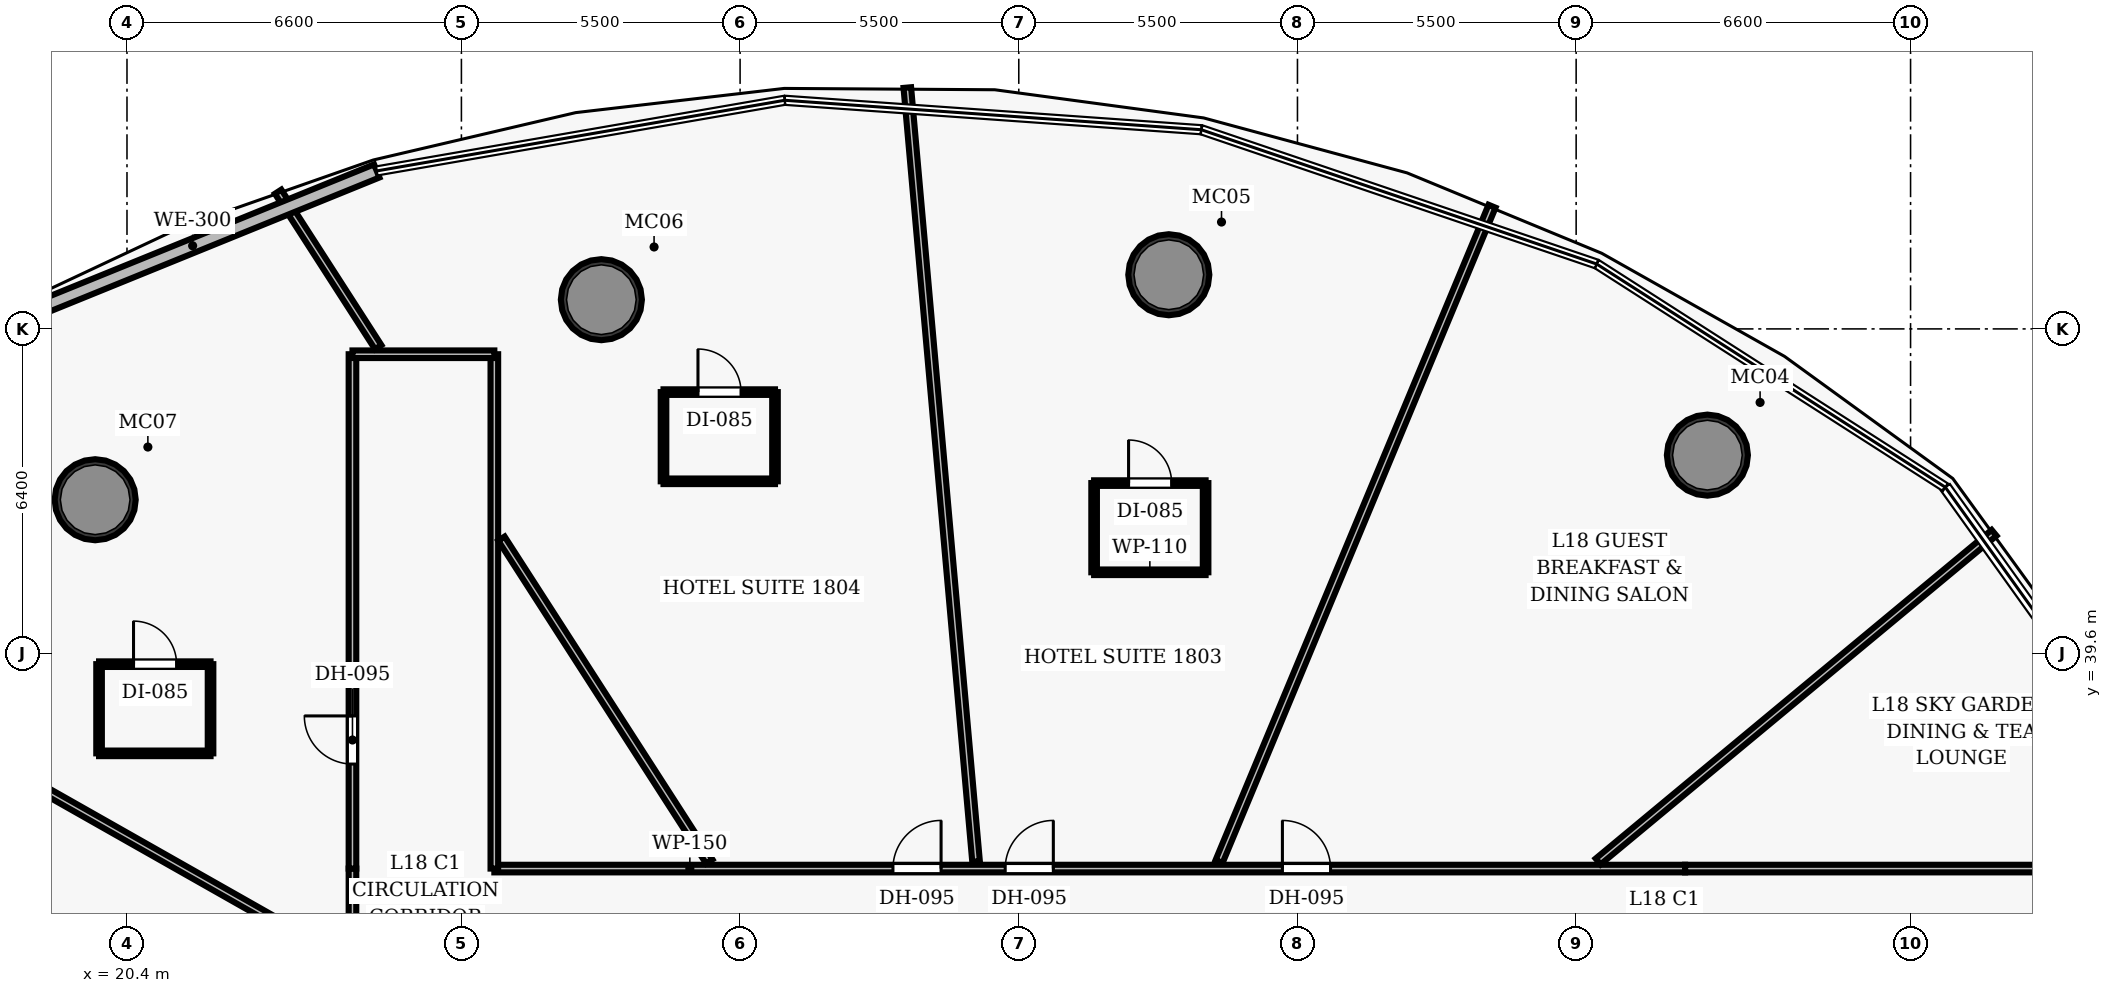
"""IFC4 building model, lengths in metres.
Left out: names, types, materials, properties, quantities, classifications, styles, units other than length and angle.
Written with IfcOpenShell. Run it as: python <this file> out.ifc"""

import sys

from ifc_helpers import new_model, si_unit, direction, frame, frame_2d, origin, origin_2d, place, context, subcontext, project, spatial, rectangle, hollow_circle, extrude, element, fill, save


model = new_model("IFC4")
c1 = context("Model", 3, precision=1e-05, world=origin(), true_north=direction((0.0, 1.0)))
c2 = subcontext(c1, "Body", "Model", "MODEL_VIEW")
j1 = project(units=[si_unit("LENGTHUNIT", "METRE"), si_unit("PLANEANGLEUNIT", "RADIAN")], contexts=[c1])
p1 = place(None, origin())
s1 = spatial("IfcSite", under=j1, at=p1, CompositionType="ELEMENT")
p2 = place(p1, origin())
s2 = spatial("IfcBuilding", under=s1, at=p2, CompositionType="ELEMENT")
p3 = place(p2, frame((0.0, 0.0, 79.9)))
s3 = spatial("IfcBuildingStorey", under=s2, at=p3, CompositionType="ELEMENT", Elevation=79.9)
for number, where, z_axis, x_axis in (
    (1, (51.59, 43.509, 0.0), (0.0, 0.0, 1.0), (1.0, 0.0, 0.0)),
    (2, (40.961, 47.069, 0.0), (0.0, 0.0, 1.0), (1.0, 0.0, 0.0)),
    (3, (29.762, 46.577, 0.0), (0.0, 0.0, 1.0), (1.0, 0.0, 0.0)),
    (4, (19.772, 42.629, 0.0), (0.0, 0.0, 1.0), (1.0, 0.0, 0.0)),
):
    element("IfcColumn", number, at=place(p3, frame(where, z_axis=z_axis, x_axis=x_axis)), inside=s3, PredefinedType="COLUMN", context=c2, shape_type="SweptSolid", body=[
        extrude(hollow_circle(Radius=0.8, WallThickness=0.06, at=origin_2d()), origin(), (0.0, 0.0, 1.0), 3.5),
    ])
p4 = place(p3, frame((27.65, 35.35, 0.0), z_axis=(0.0, 0.0, 1.0), x_axis=(1.0, 0.0, 0.0)))
e5 = element("IfcWall", 5, at=p4, inside=s3, PredefinedType="PARTITIONING", context=c2, shape_type="SweptSolid", body=[
    extrude(rectangle(XDim=23.5, YDim=0.15, at=frame_2d((11.75, 0.0))), origin(), (0.0, 0.0, 1.0), 2.6),
])
p5 = place(p4, frame((15.553, 0.0, 0.0)))
e6 = element("IfcOpeningElement", 6, at=p5, cuts=e5, PredefinedType="OPENING", context=c2, shape_type="SweptSolid", body=[
    extrude(rectangle(XDim=0.95, YDim=2.15, at=frame_2d((0.475, 1.075))), frame((0.0, 0.085, 0.0), z_axis=(0.0, -1.0, 0.0), x_axis=(1.0, 0.0, 0.0)), (0.0, 0.0, 1.0), 0.17),
])
p6 = place(p4, frame((10.082, 0.0, 0.0)))
e7 = element("IfcOpeningElement", 7, at=p6, cuts=e5, PredefinedType="OPENING", context=c2, shape_type="SweptSolid", body=[
    extrude(rectangle(XDim=0.95, YDim=2.15, at=frame_2d((0.475, 1.075))), frame((0.0, 0.085, 0.0), z_axis=(0.0, -1.0, 0.0), x_axis=(1.0, 0.0, 0.0)), (0.0, 0.0, 1.0), 0.17),
])
p7 = place(p4, frame((7.866, 0.0, 0.0)))
e8 = element("IfcOpeningElement", 8, at=p7, cuts=e5, PredefinedType="OPENING", context=c2, shape_type="SweptSolid", body=[
    extrude(rectangle(XDim=0.95, YDim=2.15, at=frame_2d((0.475, 1.075))), frame((0.0, 0.085, 0.0), z_axis=(0.0, -1.0, 0.0), x_axis=(1.0, 0.0, 0.0)), (0.0, 0.0, 1.0), 0.17),
])
p8 = place(p3, frame((24.85, 19.45, 0.0), z_axis=(0.0, 0.0, 1.0), x_axis=(0.0, 1.0, 0.0)))
e9 = element("IfcWall", 9, at=p8, inside=s3, PredefinedType="PARTITIONING", context=c2, shape_type="SweptSolid", body=[
    extrude(rectangle(XDim=15.9, YDim=0.15, at=frame_2d((7.95, 0.0))), origin(), (0.0, 0.0, 1.0), 2.6),
])
p9 = place(p8, frame((8.128, 0.0, 0.0)))
e10 = element("IfcOpeningElement", 10, at=p9, cuts=e9, PredefinedType="OPENING", context=c2, shape_type="SweptSolid", body=[
    extrude(rectangle(XDim=0.95, YDim=2.15, at=frame_2d((0.475, 1.075))), frame((0.0, 0.085, 0.0), z_axis=(0.0, -1.0, 0.0), x_axis=(1.0, 0.0, 0.0)), (0.0, 0.0, 1.0), 0.17),
])
p10 = place(p8, frame((4.98, 0.0, 0.0)))
e11 = element("IfcOpeningElement", 11, at=p10, cuts=e9, PredefinedType="OPENING", context=c2, shape_type="SweptSolid", body=[
    extrude(rectangle(XDim=0.95, YDim=2.15, at=frame_2d((0.475, 1.075))), frame((0.0, 0.085, 0.0), z_axis=(0.0, -1.0, 0.0), x_axis=(1.0, 0.0, 0.0)), (0.0, 0.0, 1.0), 0.17),
])
p11 = place(p3, frame((51.15, 35.35, 0.0), z_axis=(0.0, 0.0, 1.0), x_axis=(1.0, 0.0, 0.0)))
e12 = element("IfcWall", 12, at=p11, inside=s3, PredefinedType="PARTITIONING", context=c2, shape_type="SweptSolid", body=[
    extrude(rectangle(XDim=10.405, YDim=0.15, at=frame_2d((5.203, 0.0))), origin(), (0.0, 0.0, 1.0), 2.6),
])
p12 = place(p3, frame((24.85, 35.35, 0.0), z_axis=(0.0, 0.0, 1.0), x_axis=(0.0, 1.0, 0.0)))
e13 = element("IfcWall", 13, at=p12, inside=s3, PredefinedType="PARTITIONING", context=c2, shape_type="SweptSolid", body=[
    extrude(rectangle(XDim=10.15, YDim=0.15, at=frame_2d((5.075, 0.0))), origin(), (0.0, 0.0, 1.0), 2.6),
])
p13 = place(p12, frame((2.062, 0.0, 0.0)))
e14 = element("IfcOpeningElement", 14, at=p13, cuts=e13, PredefinedType="OPENING", context=c2, shape_type="SweptSolid", body=[
    extrude(rectangle(XDim=0.95, YDim=2.15, at=frame_2d((0.475, 1.075))), frame((0.0, 0.085, 0.0), z_axis=(0.0, -1.0, 0.0), x_axis=(1.0, 0.0, 0.0)), (0.0, 0.0, 1.0), 0.17),
])
p14 = place(p3, frame((27.65, 35.35, 0.0), z_axis=(0.0, 0.0, 1.0), x_axis=(0.0, 1.0, 0.0)))
e15 = element("IfcWall", 15, at=p14, inside=s3, PredefinedType="PARTITIONING", context=c2, shape_type="SweptSolid", body=[
    extrude(rectangle(XDim=10.15, YDim=0.15, at=frame_2d((5.075, 0.0))), origin(), (0.0, 0.0, 1.0), 2.6),
])
p15 = place(p3, frame((24.85, 45.5, 0.0), z_axis=(0.0, 0.0, 1.0), x_axis=(1.0, 0.0, 0.0)))
e16 = element("IfcWall", 16, at=p15, inside=s3, PredefinedType="PARTITIONING", context=c2, shape_type="SweptSolid", body=[
    extrude(rectangle(XDim=2.8, YDim=0.15, at=frame_2d((1.4, 0.0))), origin(), (0.0, 0.0, 1.0), 2.6),
])
p16 = place(p3, frame((49.434, 35.49, 0.0), z_axis=(0.0, 0.0, 1.0), x_axis=(0.769488794151, 0.638660313216, 0.0)))
e17 = element("IfcWall", 17, at=p16, inside=s3, PredefinedType="PARTITIONING", context=c2, shape_type="SweptSolid", body=[
    extrude(rectangle(XDim=10.155, YDim=0.15, at=frame_2d((5.078, 0.0))), origin(), (0.0, 0.0, 1.0), 2.6),
])
p17 = place(p3, frame((41.953, 35.49, 0.0), z_axis=(0.0, 0.0, 1.0), x_axis=(0.384538657387, 0.923108889013, 0.0)))
e18 = element("IfcWall", 18, at=p17, inside=s3, PredefinedType="PARTITIONING", context=c2, shape_type="SweptSolid", body=[
    extrude(rectangle(XDim=14.008, YDim=0.15, at=frame_2d((7.004, 0.0))), origin(), (0.0, 0.0, 1.0), 2.6),
])
p18 = place(p3, frame((37.157, 35.49, 0.0), z_axis=(0.0, 0.0, 1.0), x_axis=(-0.088499768289, 0.996076197393, 0.0)))
e19 = element("IfcWall", 19, at=p18, inside=s3, PredefinedType="PARTITIONING", context=c2, shape_type="SweptSolid", body=[
    extrude(rectangle(XDim=15.333, YDim=0.15, at=frame_2d((7.666, 0.0))), origin(), (0.0, 0.0, 1.0), 2.6),
])
p19 = place(p3, frame((31.891, 35.49, 0.0), z_axis=(0.0, 0.0, 1.0), x_axis=(-0.541252535473, 0.840860091123, 0.0)))
e20 = element("IfcWall", 20, at=p19, inside=s3, PredefinedType="PARTITIONING", context=c2, shape_type="SweptSolid", body=[
    extrude(rectangle(XDim=7.577, YDim=0.15, at=frame_2d((3.789, 0.0))), origin(), (0.0, 0.0, 1.0), 2.6),
])
p20 = place(p3, frame((25.358, 45.64, 0.0), z_axis=(0.0, 0.0, 1.0), x_axis=(-0.541288402423, 0.840837002874, 0.0)))
e21 = element("IfcWall", 21, at=p20, inside=s3, PredefinedType="PARTITIONING", context=c2, shape_type="SweptSolid", body=[
    extrude(rectangle(XDim=3.649, YDim=0.15, at=frame_2d((1.824, 0.0))), origin(), (0.0, 0.0, 1.0), 2.6),
])
p21 = place(p3, frame((24.71, 33.531, 0.0), z_axis=(0.0, 0.0, 1.0), x_axis=(-0.87002725421, 0.493003627707, 0.0)))
e22 = element("IfcWall", 22, at=p21, inside=s3, PredefinedType="PARTITIONING", context=c2, shape_type="SweptSolid", body=[
    extrude(rectangle(XDim=15.84, YDim=0.15, at=frame_2d((7.92, 0.0))), origin(), (0.0, 0.0, 1.0), 2.6),
])
p22 = place(p3, frame((39.487, 41.197, 0.0), z_axis=(0.0, 0.0, 1.0), x_axis=(1.0, 0.0, 0.0)))
e23 = element("IfcWall", 23, at=p22, inside=s3, PredefinedType="PARTITIONING", context=c2, shape_type="SweptSolid", body=[
    extrude(rectangle(XDim=2.2, YDim=0.11, at=frame_2d((1.1, 0.0))), origin(), (0.0, 0.0, 1.0), 2.6),
])
p23 = place(p3, frame((39.487, 42.957, 0.0), z_axis=(0.0, 0.0, 1.0), x_axis=(1.0, 0.0, 0.0)))
e24 = element("IfcWall", 24, at=p23, inside=s3, PredefinedType="PARTITIONING", context=c2, shape_type="SweptSolid", body=[
    extrude(rectangle(XDim=2.2, YDim=0.11, at=frame_2d((1.1, 0.0))), origin(), (0.0, 0.0, 1.0), 2.6),
])
p24 = place(p23, frame((0.68, 0.0, 0.0)))
e25 = element("IfcOpeningElement", 25, at=p24, cuts=e24, PredefinedType="OPENING", context=c2, shape_type="SweptSolid", body=[
    extrude(rectangle(XDim=0.85, YDim=2.1, at=frame_2d((0.425, 1.05))), frame((0.0, 0.065, 0.0), z_axis=(0.0, -1.0, 0.0), x_axis=(1.0, 0.0, 0.0)), (0.0, 0.0, 1.0), 0.13),
])
for number, where, z_axis, x_axis in (
    (26, (39.487, 41.197, 0.0), (0.0, 0.0, 1.0), (0.0, 1.0, 0.0)),
    (27, (41.687, 41.197, 0.0), (0.0, 0.0, 1.0), (0.0, 1.0, 0.0)),
):
    element("IfcWall", number, at=place(p3, frame(where, z_axis=z_axis, x_axis=x_axis)), inside=s3, PredefinedType="PARTITIONING", context=c2, shape_type="SweptSolid", body=[
        extrude(rectangle(XDim=1.76, YDim=0.11, at=frame_2d((0.88, 0.0))), origin(), (0.0, 0.0, 1.0), 2.6),
    ])
p25 = place(p3, frame((30.989, 42.993, 0.0), z_axis=(0.0, 0.0, 1.0), x_axis=(1.0, 0.0, 0.0)))
e28 = element("IfcWall", 28, at=p25, inside=s3, PredefinedType="PARTITIONING", context=c2, shape_type="SweptSolid", body=[
    extrude(rectangle(XDim=2.2, YDim=0.11, at=frame_2d((1.1, 0.0))), origin(), (0.0, 0.0, 1.0), 2.6),
])
p26 = place(p3, frame((30.989, 44.753, 0.0), z_axis=(0.0, 0.0, 1.0), x_axis=(1.0, 0.0, 0.0)))
e29 = element("IfcWall", 29, at=p26, inside=s3, PredefinedType="PARTITIONING", context=c2, shape_type="SweptSolid", body=[
    extrude(rectangle(XDim=2.2, YDim=0.11, at=frame_2d((1.1, 0.0))), origin(), (0.0, 0.0, 1.0), 2.6),
])
p27 = place(p26, frame((0.68, 0.0, 0.0)))
e30 = element("IfcOpeningElement", 30, at=p27, cuts=e29, PredefinedType="OPENING", context=c2, shape_type="SweptSolid", body=[
    extrude(rectangle(XDim=0.85, YDim=2.1, at=frame_2d((0.425, 1.05))), frame((0.0, 0.065, 0.0), z_axis=(0.0, -1.0, 0.0), x_axis=(1.0, 0.0, 0.0)), (0.0, 0.0, 1.0), 0.13),
])
for number, where, z_axis, x_axis in (
    (31, (30.989, 42.993, 0.0), (0.0, 0.0, 1.0), (0.0, 1.0, 0.0)),
    (32, (33.189, 42.993, 0.0), (0.0, 0.0, 1.0), (0.0, 1.0, 0.0)),
):
    element("IfcWall", number, at=place(p3, frame(where, z_axis=z_axis, x_axis=x_axis)), inside=s3, PredefinedType="PARTITIONING", context=c2, shape_type="SweptSolid", body=[
        extrude(rectangle(XDim=1.76, YDim=0.11, at=frame_2d((0.88, 0.0))), origin(), (0.0, 0.0, 1.0), 2.6),
    ])
p28 = place(p3, frame((19.849, 37.624, 0.0), z_axis=(0.0, 0.0, 1.0), x_axis=(1.0, 0.0, 0.0)))
e33 = element("IfcWall", 33, at=p28, inside=s3, PredefinedType="PARTITIONING", context=c2, shape_type="SweptSolid", body=[
    extrude(rectangle(XDim=2.2, YDim=0.11, at=frame_2d((1.1, 0.0))), origin(), (0.0, 0.0, 1.0), 2.6),
])
p29 = place(p3, frame((19.849, 39.384, 0.0), z_axis=(0.0, 0.0, 1.0), x_axis=(1.0, 0.0, 0.0)))
e34 = element("IfcWall", 34, at=p29, inside=s3, PredefinedType="PARTITIONING", context=c2, shape_type="SweptSolid", body=[
    extrude(rectangle(XDim=2.2, YDim=0.11, at=frame_2d((1.1, 0.0))), origin(), (0.0, 0.0, 1.0), 2.6),
])
p30 = place(p29, frame((0.68, 0.0, 0.0)))
e35 = element("IfcOpeningElement", 35, at=p30, cuts=e34, PredefinedType="OPENING", context=c2, shape_type="SweptSolid", body=[
    extrude(rectangle(XDim=0.85, YDim=2.1, at=frame_2d((0.425, 1.05))), frame((0.0, 0.065, 0.0), z_axis=(0.0, -1.0, 0.0), x_axis=(1.0, 0.0, 0.0)), (0.0, 0.0, 1.0), 0.13),
])
for number, where, z_axis, x_axis in (
    (36, (19.849, 37.624, 0.0), (0.0, 0.0, 1.0), (0.0, 1.0, 0.0)),
    (37, (22.049, 37.624, 0.0), (0.0, 0.0, 1.0), (0.0, 1.0, 0.0)),
):
    element("IfcWall", number, at=place(p3, frame(where, z_axis=z_axis, x_axis=x_axis)), inside=s3, PredefinedType="PARTITIONING", context=c2, shape_type="SweptSolid", body=[
        extrude(rectangle(XDim=1.76, YDim=0.11, at=frame_2d((0.88, 0.0))), origin(), (0.0, 0.0, 1.0), 2.6),
    ])
p31 = place(p3, frame((18.062, 46.164, 0.0), z_axis=(0.0, 0.0, 1.0), x_axis=(0.926415021548, 0.376503928067, 0.0)))
e38 = element("IfcWall", 38, at=p31, inside=s3, PredefinedType="SOLIDWALL", context=c2, shape_type="SweptSolid", body=[
    extrude(rectangle(XDim=7.845, YDim=0.28, at=frame_2d((3.922, 0.0))), origin(), (0.0, 0.0, 1.0), 3.25),
])
p32 = place(p5, origin())
e39 = element("IfcDoor", 39, at=p32, inside=s3, OperationType="SINGLE_SWING_LEFT", PredefinedType="DOOR", context=c2, shape_type="SweptSolid", body=[
    extrude(rectangle(XDim=0.95, YDim=2.15, at=frame_2d((0.475, 1.075))), frame((0.0, 0.025, 0.0), z_axis=(0.0, -1.0, 0.0), x_axis=(1.0, 0.0, 0.0)), (0.0, 0.0, 1.0), 0.05),
])
fill(e6, e39)
p33 = place(p6, origin())
e40 = element("IfcDoor", 40, at=p33, inside=s3, OperationType="SINGLE_SWING_RIGHT", PredefinedType="DOOR", context=c2, shape_type="SweptSolid", body=[
    extrude(rectangle(XDim=0.95, YDim=2.15, at=frame_2d((0.475, 1.075))), frame((0.0, 0.025, 0.0), z_axis=(0.0, -1.0, 0.0), x_axis=(1.0, 0.0, 0.0)), (0.0, 0.0, 1.0), 0.05),
])
fill(e7, e40)
p34 = place(p24, origin())
e41 = element("IfcDoor", 41, at=p34, inside=s3, OperationType="SINGLE_SWING_LEFT", PredefinedType="DOOR", context=c2, shape_type="SweptSolid", body=[
    extrude(rectangle(XDim=0.85, YDim=2.1, at=frame_2d((0.425, 1.05))), frame((0.0, 0.025, 0.0), z_axis=(0.0, -1.0, 0.0), x_axis=(1.0, 0.0, 0.0)), (0.0, 0.0, 1.0), 0.05),
])
fill(e25, e41)
p35 = place(p7, origin())
e42 = element("IfcDoor", 42, at=p35, inside=s3, OperationType="SINGLE_SWING_RIGHT", PredefinedType="DOOR", context=c2, shape_type="SweptSolid", body=[
    extrude(rectangle(XDim=0.95, YDim=2.15, at=frame_2d((0.475, 1.075))), frame((0.0, 0.025, 0.0), z_axis=(0.0, -1.0, 0.0), x_axis=(1.0, 0.0, 0.0)), (0.0, 0.0, 1.0), 0.05),
])
fill(e8, e42)
p36 = place(p27, origin())
e43 = element("IfcDoor", 43, at=p36, inside=s3, OperationType="SINGLE_SWING_LEFT", PredefinedType="DOOR", context=c2, shape_type="SweptSolid", body=[
    extrude(rectangle(XDim=0.85, YDim=2.1, at=frame_2d((0.425, 1.05))), frame((0.0, 0.025, 0.0), z_axis=(0.0, -1.0, 0.0), x_axis=(1.0, 0.0, 0.0)), (0.0, 0.0, 1.0), 0.05),
])
fill(e30, e43)
p37 = place(p13, origin())
e44 = element("IfcDoor", 44, at=p37, inside=s3, OperationType="SINGLE_SWING_RIGHT", PredefinedType="DOOR", context=c2, shape_type="SweptSolid", body=[
    extrude(rectangle(XDim=0.95, YDim=2.15, at=frame_2d((0.475, 1.075))), frame((0.0, 0.025, 0.0), z_axis=(0.0, -1.0, 0.0), x_axis=(1.0, 0.0, 0.0)), (0.0, 0.0, 1.0), 0.05),
])
fill(e14, e44)
p38 = place(p30, origin())
e45 = element("IfcDoor", 45, at=p38, inside=s3, OperationType="SINGLE_SWING_LEFT", PredefinedType="DOOR", context=c2, shape_type="SweptSolid", body=[
    extrude(rectangle(XDim=0.85, YDim=2.1, at=frame_2d((0.425, 1.05))), frame((0.0, 0.025, 0.0), z_axis=(0.0, -1.0, 0.0), x_axis=(1.0, 0.0, 0.0)), (0.0, 0.0, 1.0), 0.05),
])
fill(e35, e45)
save(model, sys.argv[1])
